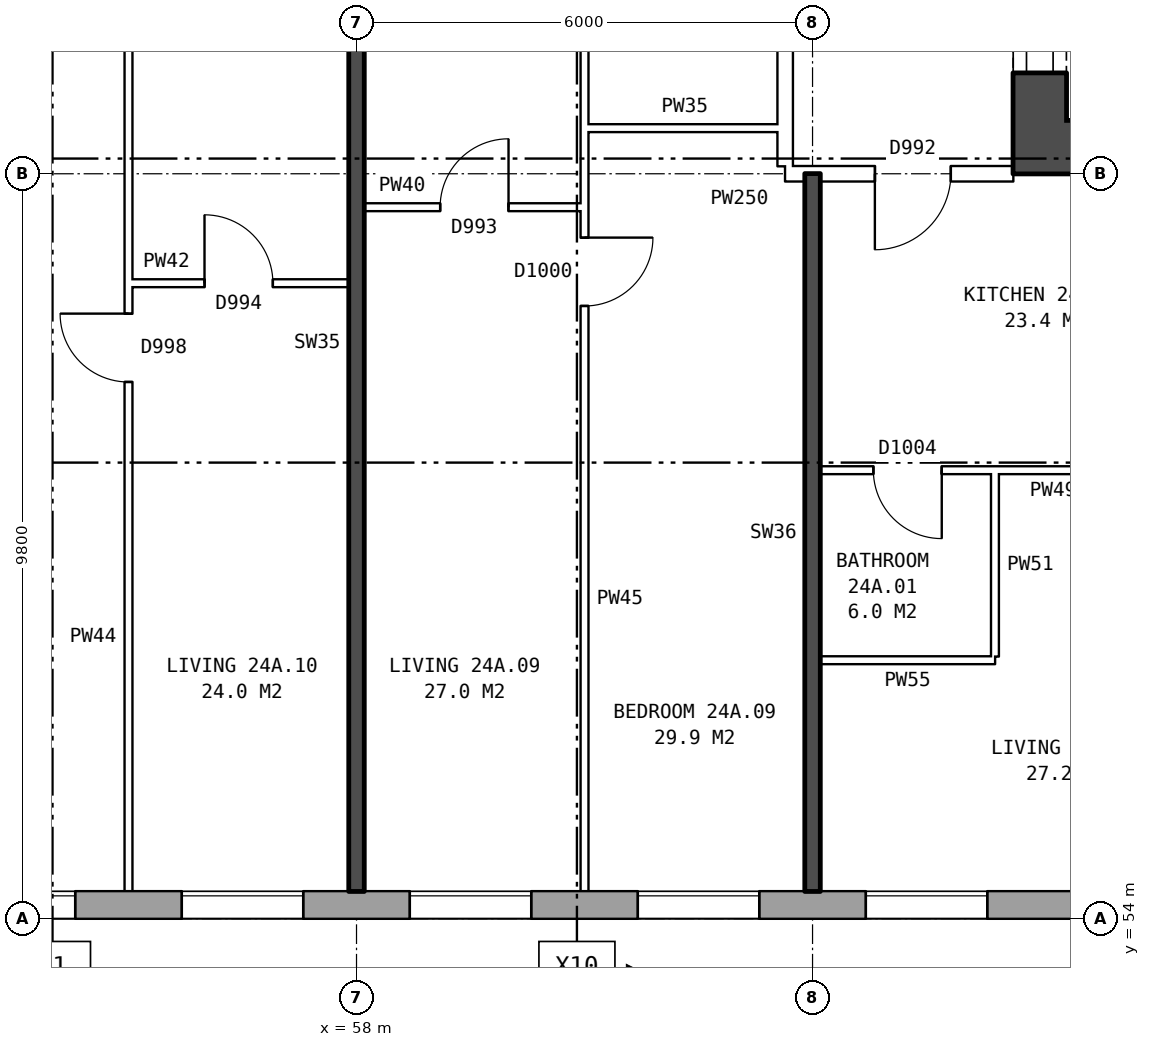
"""IFC4 building model, lengths in metres.
Left out: names, types, materials, properties, quantities, classifications, styles, units other than length and angle.
Written with IfcOpenShell. Run it as: python <this file> out.ifc"""

import sys

from ifc_helpers import new_model, si_unit, direction, frame, frame_2d, origin, place, context, subcontext, project, spatial, rectangle, extrude, element, fill, save


model = new_model("IFC4")
c1 = context("Model", 3, precision=1e-05, world=origin(), true_north=direction((0.0, 1.0)))
c2 = subcontext(c1, "Body", "Model", "MODEL_VIEW")
j1 = project(units=[si_unit("LENGTHUNIT", "METRE"), si_unit("PLANEANGLEUNIT", "RADIAN")], contexts=[c1])
p1 = place(None, origin())
s1 = spatial("IfcSite", under=j1, at=p1, CompositionType="ELEMENT")
p2 = place(p1, origin())
s2 = spatial("IfcBuilding", under=s1, at=p2, CompositionType="ELEMENT")
p3 = place(p2, frame((0.0, 0.0, 87.1)))
s3 = spatial("IfcBuildingStorey", under=s2, at=p3, CompositionType="ELEMENT", Elevation=87.1)
p4 = place(p3, frame((26.325, 54.18, 0.0), z_axis=(0.0, 0.0, 1.0), x_axis=(1.0, 0.0, 0.0)))
e1 = element("IfcWall", 1, at=p4, inside=s3, PredefinedType="STANDARD", context=c2, shape_type="SweptSolid", body=[
    extrude(rectangle(XDim=46.601, YDim=0.36, at=frame_2d((23.3, 0.0))), origin(), (0.0, 0.0, 1.0), 2.85),
])
p5 = place(p4, frame((2.375, 0.0, 0.8)))
e2 = element("IfcOpeningElement", 2, at=p5, cuts=e1, PredefinedType="OPENING", context=c2, shape_type="SweptSolid", body=[
    extrude(rectangle(XDim=1.6, YDim=1.8, at=frame_2d((0.8, 0.9))), frame((0.0, 0.19, 0.0), z_axis=(0.0, -1.0, 0.0), x_axis=(1.0, 0.0, 0.0)), (0.0, 0.0, 1.0), 0.38),
])
p6 = place(p4, frame((5.375, 0.0, 0.8)))
e3 = element("IfcOpeningElement", 3, at=p6, cuts=e1, PredefinedType="OPENING", context=c2, shape_type="SweptSolid", body=[
    extrude(rectangle(XDim=1.6, YDim=1.8, at=frame_2d((0.8, 0.9))), frame((0.0, 0.19, 0.0), z_axis=(0.0, -1.0, 0.0), x_axis=(1.0, 0.0, 0.0)), (0.0, 0.0, 1.0), 0.38),
])
p7 = place(p4, frame((8.375, 0.0, 0.8)))
e4 = element("IfcOpeningElement", 4, at=p7, cuts=e1, PredefinedType="OPENING", context=c2, shape_type="SweptSolid", body=[
    extrude(rectangle(XDim=1.6, YDim=1.8, at=frame_2d((0.8, 0.9))), frame((0.0, 0.19, 0.0), z_axis=(0.0, -1.0, 0.0), x_axis=(1.0, 0.0, 0.0)), (0.0, 0.0, 1.0), 0.38),
])
p8 = place(p4, frame((11.375, 0.0, 0.8)))
e5 = element("IfcOpeningElement", 5, at=p8, cuts=e1, PredefinedType="OPENING", context=c2, shape_type="SweptSolid", body=[
    extrude(rectangle(XDim=1.6, YDim=1.8, at=frame_2d((0.8, 0.9))), frame((0.0, 0.19, 0.0), z_axis=(0.0, -1.0, 0.0), x_axis=(1.0, 0.0, 0.0)), (0.0, 0.0, 1.0), 0.38),
])
p9 = place(p4, frame((14.375, 0.0, 0.8)))
e6 = element("IfcOpeningElement", 6, at=p9, cuts=e1, PredefinedType="OPENING", context=c2, shape_type="SweptSolid", body=[
    extrude(rectangle(XDim=1.6, YDim=1.8, at=frame_2d((0.8, 0.9))), frame((0.0, 0.19, 0.0), z_axis=(0.0, -1.0, 0.0), x_axis=(1.0, 0.0, 0.0)), (0.0, 0.0, 1.0), 0.38),
])
p10 = place(p4, frame((17.375, 0.0, 0.8)))
e7 = element("IfcOpeningElement", 7, at=p10, cuts=e1, PredefinedType="OPENING", context=c2, shape_type="SweptSolid", body=[
    extrude(rectangle(XDim=1.6, YDim=1.8, at=frame_2d((0.8, 0.9))), frame((0.0, 0.19, 0.0), z_axis=(0.0, -1.0, 0.0), x_axis=(1.0, 0.0, 0.0)), (0.0, 0.0, 1.0), 0.38),
])
p11 = place(p4, frame((19.875, 0.0, 1.4)))
e8 = element("IfcOpeningElement", 8, at=p11, cuts=e1, PredefinedType="OPENING", context=c2, shape_type="SweptSolid", body=[
    extrude(rectangle(XDim=1.2, YDim=1.2, at=frame_2d((0.6, 0.6))), frame((0.0, 0.19, 0.0), z_axis=(0.0, -1.0, 0.0), x_axis=(1.0, 0.0, 0.0)), (0.0, 0.0, 1.0), 0.38),
])
p12 = place(p4, frame((22.825, 0.0, 0.25)))
e9 = element("IfcOpeningElement", 9, at=p12, cuts=e1, PredefinedType="OPENING", context=c2, shape_type="SweptSolid", body=[
    extrude(rectangle(XDim=0.8, YDim=1.5, at=frame_2d((0.4, 0.75))), frame((0.0, 0.19, 0.0), z_axis=(0.0, -1.0, 0.0), x_axis=(1.0, 0.0, 0.0)), (0.0, 0.0, 1.0), 0.38),
])
p13 = place(p4, frame((26.375, 0.0, 0.8)))
e10 = element("IfcOpeningElement", 10, at=p13, cuts=e1, PredefinedType="OPENING", context=c2, shape_type="SweptSolid", body=[
    extrude(rectangle(XDim=1.6, YDim=1.8, at=frame_2d((0.8, 0.9))), frame((0.0, 0.19, 0.0), z_axis=(0.0, -1.0, 0.0), x_axis=(1.0, 0.0, 0.0)), (0.0, 0.0, 1.0), 0.38),
])
p14 = place(p4, frame((29.375, 0.0, 0.8)))
e11 = element("IfcOpeningElement", 11, at=p14, cuts=e1, PredefinedType="OPENING", context=c2, shape_type="SweptSolid", body=[
    extrude(rectangle(XDim=1.6, YDim=1.8, at=frame_2d((0.8, 0.9))), frame((0.0, 0.19, 0.0), z_axis=(0.0, -1.0, 0.0), x_axis=(1.0, 0.0, 0.0)), (0.0, 0.0, 1.0), 0.38),
])
p15 = place(p4, frame((32.375, 0.0, 0.8)))
e12 = element("IfcOpeningElement", 12, at=p15, cuts=e1, PredefinedType="OPENING", context=c2, shape_type="SweptSolid", body=[
    extrude(rectangle(XDim=1.6, YDim=1.8, at=frame_2d((0.8, 0.9))), frame((0.0, 0.19, 0.0), z_axis=(0.0, -1.0, 0.0), x_axis=(1.0, 0.0, 0.0)), (0.0, 0.0, 1.0), 0.38),
])
p16 = place(p4, frame((35.375, 0.0, 0.8)))
e13 = element("IfcOpeningElement", 13, at=p16, cuts=e1, PredefinedType="OPENING", context=c2, shape_type="SweptSolid", body=[
    extrude(rectangle(XDim=1.6, YDim=1.8, at=frame_2d((0.8, 0.9))), frame((0.0, 0.19, 0.0), z_axis=(0.0, -1.0, 0.0), x_axis=(1.0, 0.0, 0.0)), (0.0, 0.0, 1.0), 0.38),
])
p17 = place(p4, frame((38.375, 0.0, 0.8)))
e14 = element("IfcOpeningElement", 14, at=p17, cuts=e1, PredefinedType="OPENING", context=c2, shape_type="SweptSolid", body=[
    extrude(rectangle(XDim=1.6, YDim=1.8, at=frame_2d((0.8, 0.9))), frame((0.0, 0.19, 0.0), z_axis=(0.0, -1.0, 0.0), x_axis=(1.0, 0.0, 0.0)), (0.0, 0.0, 1.0), 0.38),
])
p18 = place(p4, frame((41.375, 0.0, 0.8)))
e15 = element("IfcOpeningElement", 15, at=p18, cuts=e1, PredefinedType="OPENING", context=c2, shape_type="SweptSolid", body=[
    extrude(rectangle(XDim=1.6, YDim=1.8, at=frame_2d((0.8, 0.9))), frame((0.0, 0.19, 0.0), z_axis=(0.0, -1.0, 0.0), x_axis=(1.0, 0.0, 0.0)), (0.0, 0.0, 1.0), 0.38),
])
p19 = place(p4, frame((44.375, 0.0, 0.8)))
e16 = element("IfcOpeningElement", 16, at=p19, cuts=e1, PredefinedType="OPENING", context=c2, shape_type="SweptSolid", body=[
    extrude(rectangle(XDim=1.6, YDim=1.8, at=frame_2d((0.8, 0.9))), frame((0.0, 0.19, 0.0), z_axis=(0.0, -1.0, 0.0), x_axis=(1.0, 0.0, 0.0)), (0.0, 0.0, 1.0), 0.38),
])
p20 = place(p4, frame((23.925, 0.0, 0.15)))
e17 = element("IfcOpeningElement", 17, at=p20, cuts=e1, PredefinedType="OPENING", context=c2, shape_type="SweptSolid", body=[
    extrude(rectangle(XDim=0.6, YDim=0.9, at=frame_2d((0.3, 0.45))), frame((0.0, 0.19, 0.0), z_axis=(0.0, -1.0, 0.0), x_axis=(1.0, 0.0, 0.0)), (0.0, 0.0, 1.0), 0.38),
])
p21 = place(p3, frame((66.99, 64.5, 0.0), z_axis=(0.0, 0.0, 1.0), x_axis=(0.0, 1.0, 0.0)))
e18 = element("IfcWall", 18, at=p21, inside=s3, PredefinedType="SHEAR", context=c2, shape_type="SweptSolid", body=[
    extrude(rectangle(XDim=11.0, YDim=0.7, at=frame_2d((5.5, 0.0))), origin(), (0.0, 0.0, 1.0), 2.85),
])
p22 = place(p21, frame((0.625, 0.0, 0.0)))
e19 = element("IfcOpeningElement", 19, at=p22, cuts=e18, PredefinedType="OPENING", context=c2, shape_type="SweptSolid", body=[
    extrude(rectangle(XDim=1.1, YDim=2.1, at=frame_2d((0.55, 1.05))), frame((0.0, 0.36, 0.0), z_axis=(0.0, -1.0, 0.0), x_axis=(1.0, 0.0, 0.0)), (0.0, 0.0, 1.0), 0.72),
])
p23 = place(p21, frame((9.2, 0.0, 0.0)))
e20 = element("IfcOpeningElement", 20, at=p23, cuts=e18, PredefinedType="OPENING", context=c2, shape_type="SweptSolid", body=[
    extrude(rectangle(XDim=1.1, YDim=2.1, at=frame_2d((0.55, 1.05))), frame((0.0, 0.36, 0.0), z_axis=(0.0, -1.0, 0.0), x_axis=(1.0, 0.0, 0.0)), (0.0, 0.0, 1.0), 0.72),
])
p24 = place(p3, frame((66.64, 64.15, 0.0), z_axis=(0.0, 0.0, 1.0), x_axis=(1.0, 0.0, 0.0)))
e21 = element("IfcWall", 21, at=p24, inside=s3, PredefinedType="SHEAR", context=c2, shape_type="SweptSolid", body=[
    extrude(rectangle(XDim=9.0, YDim=0.7, at=frame_2d((4.5, 0.0))), origin(), (0.0, 0.0, 1.0), 2.85),
])
p25 = place(p3, frame((63.64, 63.9, 0.0), z_axis=(0.0, 0.0, 1.0), x_axis=(0.0, 1.0, 0.0)))
e22 = element("IfcWall", 22, at=p25, inside=s3, PredefinedType="PARTITIONING", context=c2, shape_type="SweptSolid", body=[
    extrude(rectangle(XDim=12.2, YDim=0.2, at=frame_2d((6.1, 0.0))), origin(), (0.0, 0.0, 1.0), 2.85),
])
p26 = place(p25, frame((5.1, 0.0, 0.0)))
e23 = element("IfcOpeningElement", 23, at=p26, cuts=e22, PredefinedType="OPENING", context=c2, shape_type="SweptSolid", body=[
    extrude(rectangle(XDim=2.0, YDim=2.1, at=frame_2d((1.0, 1.05))), frame((0.0, 0.11, 0.0), z_axis=(0.0, -1.0, 0.0), x_axis=(1.0, 0.0, 0.0)), (0.0, 0.0, 1.0), 0.22),
])
p27 = place(p3, frame((64.1, 57.4, 0.0), z_axis=(0.0, 0.0, 1.0), x_axis=(1.0, 0.0, 0.0)))
e24 = element("IfcWall", 24, at=p27, inside=s3, PredefinedType="PARTITIONING", context=c2, shape_type="SweptSolid", body=[
    extrude(rectangle(XDim=2.3, YDim=0.1, at=frame_2d((1.15, 0.0))), origin(), (0.0, 0.0, 1.0), 2.85),
])
p28 = place(p3, frame((64.1, 59.9, 0.0), z_axis=(0.0, 0.0, 1.0), x_axis=(1.0, 0.0, 0.0)))
e25 = element("IfcWall", 25, at=p28, inside=s3, PredefinedType="PARTITIONING", context=c2, shape_type="SweptSolid", body=[
    extrude(rectangle(XDim=5.8, YDim=0.1, at=frame_2d((2.9, 0.0))), origin(), (0.0, 0.0, 1.0), 2.85),
])
p29 = place(p28, frame((3.6, 0.0, 0.0)))
e26 = element("IfcOpeningElement", 26, at=p29, cuts=e25, PredefinedType="OPENING", context=c2, shape_type="SweptSolid", body=[
    extrude(rectangle(XDim=0.9, YDim=2.1, at=frame_2d((0.45, 1.05))), frame((0.0, 0.06, 0.0), z_axis=(0.0, -1.0, 0.0), x_axis=(1.0, 0.0, 0.0)), (0.0, 0.0, 1.0), 0.12),
])
p30 = place(p28, frame((0.7, 0.0, 0.0)))
e27 = element("IfcOpeningElement", 27, at=p30, cuts=e25, PredefinedType="OPENING", context=c2, shape_type="SweptSolid", body=[
    extrude(rectangle(XDim=0.9, YDim=2.1, at=frame_2d((0.45, 1.05))), frame((0.0, 0.06, 0.0), z_axis=(0.0, -1.0, 0.0), x_axis=(1.0, 0.0, 0.0)), (0.0, 0.0, 1.0), 0.12),
])
p31 = place(p3, frame((55.0, 62.36, 0.0), z_axis=(0.0, 0.0, 1.0), x_axis=(1.0, 0.0, 0.0)))
e28 = element("IfcWall", 28, at=p31, inside=s3, PredefinedType="PARTITIONING", context=c2, shape_type="SweptSolid", body=[
    extrude(rectangle(XDim=2.9, YDim=0.1, at=frame_2d((1.45, 0.0))), origin(), (0.0, 0.0, 1.0), 2.85),
])
p32 = place(p31, frame((1.0, 0.0, 0.0)))
e29 = element("IfcOpeningElement", 29, at=p32, cuts=e28, PredefinedType="OPENING", context=c2, shape_type="SweptSolid", body=[
    extrude(rectangle(XDim=0.9, YDim=2.1, at=frame_2d((0.45, 1.05))), frame((0.0, 0.06, 0.0), z_axis=(0.0, -1.0, 0.0), x_axis=(1.0, 0.0, 0.0)), (0.0, 0.0, 1.0), 0.12),
])
p33 = place(p3, frame((58.1, 63.36, 0.0), z_axis=(0.0, 0.0, 1.0), x_axis=(1.0, 0.0, 0.0)))
e30 = element("IfcWall", 30, at=p33, inside=s3, PredefinedType="PARTITIONING", context=c2, shape_type="SweptSolid", body=[
    extrude(rectangle(XDim=2.9, YDim=0.1, at=frame_2d((1.45, 0.0))), origin(), (0.0, 0.0, 1.0), 2.85),
])
p34 = place(p33, frame((1.0, 0.0, 0.0)))
e31 = element("IfcOpeningElement", 31, at=p34, cuts=e30, PredefinedType="OPENING", context=c2, shape_type="SweptSolid", body=[
    extrude(rectangle(XDim=0.9, YDim=2.1, at=frame_2d((0.45, 1.05))), frame((0.0, 0.06, 0.0), z_axis=(0.0, -1.0, 0.0), x_axis=(1.0, 0.0, 0.0)), (0.0, 0.0, 1.0), 0.12),
])
p35 = place(p3, frame((63.64, 63.8, 0.0), z_axis=(0.0, 0.0, 1.0), x_axis=(1.0, 0.0, 0.0)))
e32 = element("IfcWall", 32, at=p35, inside=s3, PredefinedType="PARTITIONING", context=c2, shape_type="SweptSolid", body=[
    extrude(rectangle(XDim=3.0, YDim=0.2, at=frame_2d((1.5, 0.0))), origin(), (0.0, 0.0, 1.0), 2.85),
])
p36 = place(p35, frame((1.18, 0.0, 0.0)))
e33 = element("IfcOpeningElement", 33, at=p36, cuts=e32, PredefinedType="OPENING", context=c2, shape_type="SweptSolid", body=[
    extrude(rectangle(XDim=1.0, YDim=2.1, at=frame_2d((0.5, 1.05))), frame((0.0, 0.11, 0.0), z_axis=(0.0, -1.0, 0.0), x_axis=(1.0, 0.0, 0.0)), (0.0, 0.0, 1.0), 0.22),
])
p37 = place(p3, frame((61.0, 64.4, 0.0), z_axis=(0.0, 0.0, 1.0), x_axis=(1.0, 0.0, 0.0)))
e34 = element("IfcWall", 34, at=p37, inside=s3, PredefinedType="PARTITIONING", context=c2, shape_type="SweptSolid", body=[
    extrude(rectangle(XDim=2.64, YDim=0.1, at=frame_2d((1.32, 0.0))), origin(), (0.0, 0.0, 1.0), 2.85),
])
p38 = place(p3, frame((55.0, 54.36, 0.0), z_axis=(0.0, 0.0, 1.0), x_axis=(0.0, 1.0, 0.0)))
e35 = element("IfcWall", 35, at=p38, inside=s3, PredefinedType="PARTITIONING", context=c2, shape_type="SweptSolid", body=[
    extrude(rectangle(XDim=14.34, YDim=0.1, at=frame_2d((7.17, 0.0))), origin(), (0.0, 0.0, 1.0), 2.85),
])
p39 = place(p38, frame((6.7, 0.0, 0.0)))
e36 = element("IfcOpeningElement", 36, at=p39, cuts=e35, PredefinedType="OPENING", context=c2, shape_type="SweptSolid", body=[
    extrude(rectangle(XDim=0.9, YDim=2.1, at=frame_2d((0.45, 1.05))), frame((0.0, 0.06, 0.0), z_axis=(0.0, -1.0, 0.0), x_axis=(1.0, 0.0, 0.0)), (0.0, 0.0, 1.0), 0.12),
])
p40 = place(p38, frame((13.04, 0.0, 0.0)))
e37 = element("IfcOpeningElement", 37, at=p40, cuts=e35, PredefinedType="OPENING", context=c2, shape_type="SweptSolid", body=[
    extrude(rectangle(XDim=0.9, YDim=2.1, at=frame_2d((0.45, 1.05))), frame((0.0, 0.06, 0.0), z_axis=(0.0, -1.0, 0.0), x_axis=(1.0, 0.0, 0.0)), (0.0, 0.0, 1.0), 0.12),
])
p41 = place(p3, frame((58.0, 54.36, 0.0), z_axis=(0.0, 0.0, 1.0), x_axis=(0.0, 1.0, 0.0)))
e38 = element("IfcWall", 38, at=p41, inside=s3, PredefinedType="SOLIDWALL", context=c2, shape_type="SweptSolid", body=[
    extrude(rectangle(XDim=14.44, YDim=0.2, at=frame_2d((7.22, 0.0))), origin(), (0.0, 0.0, 1.0), 2.85),
])
p42 = place(p3, frame((61.0, 54.36, 0.0), z_axis=(0.0, 0.0, 1.0), x_axis=(0.0, 1.0, 0.0)))
e39 = element("IfcWall", 39, at=p42, inside=s3, PredefinedType="PARTITIONING", context=c2, shape_type="SweptSolid", body=[
    extrude(rectangle(XDim=14.34, YDim=0.1, at=frame_2d((7.17, 0.0))), origin(), (0.0, 0.0, 1.0), 2.85),
])
p43 = place(p42, frame((7.7, 0.0, 0.0)))
e40 = element("IfcOpeningElement", 40, at=p43, cuts=e39, PredefinedType="OPENING", context=c2, shape_type="SweptSolid", body=[
    extrude(rectangle(XDim=0.9, YDim=2.1, at=frame_2d((0.45, 1.05))), frame((0.0, 0.06, 0.0), z_axis=(0.0, -1.0, 0.0), x_axis=(1.0, 0.0, 0.0)), (0.0, 0.0, 1.0), 0.12),
])
p44 = place(p42, frame((13.04, 0.0, 0.0)))
e41 = element("IfcOpeningElement", 41, at=p44, cuts=e39, PredefinedType="OPENING", context=c2, shape_type="SweptSolid", body=[
    extrude(rectangle(XDim=0.9, YDim=2.1, at=frame_2d((0.45, 1.05))), frame((0.0, 0.06, 0.0), z_axis=(0.0, -1.0, 0.0), x_axis=(1.0, 0.0, 0.0)), (0.0, 0.0, 1.0), 0.12),
])
p45 = place(p3, frame((64.0, 54.36, 0.0), z_axis=(0.0, 0.0, 1.0), x_axis=(0.0, 1.0, 0.0)))
e42 = element("IfcWall", 42, at=p45, inside=s3, PredefinedType="SOLIDWALL", context=c2, shape_type="SweptSolid", body=[
    extrude(rectangle(XDim=9.44, YDim=0.2, at=frame_2d((4.72, 0.0))), origin(), (0.0, 0.0, 1.0), 2.85),
])
p46 = place(p3, frame((66.4, 57.45, 0.0), z_axis=(0.0, 0.0, 1.0), x_axis=(0.0, 1.0, 0.0)))
e43 = element("IfcWall", 43, at=p46, inside=s3, PredefinedType="PARTITIONING", context=c2, shape_type="SweptSolid", body=[
    extrude(rectangle(XDim=2.4, YDim=0.1, at=frame_2d((1.2, 0.0))), origin(), (0.0, 0.0, 1.0), 2.85),
])
p47 = place(p13, origin())
e44 = element("IfcWindow", 44, at=p47, inside=s3, PartitioningType="SINGLE_PANEL", PredefinedType="WINDOW", context=c2, shape_type="SweptSolid", body=[
    extrude(rectangle(XDim=1.6, YDim=1.8, at=frame_2d((0.8, 0.9))), frame((0.0, 0.15, 0.0), z_axis=(0.0, -1.0, 0.0), x_axis=(1.0, 0.0, 0.0)), (0.0, 0.0, 1.0), 0.06),
])
fill(e10, e44)
p48 = place(p14, origin())
e45 = element("IfcWindow", 45, at=p48, inside=s3, PartitioningType="SINGLE_PANEL", PredefinedType="WINDOW", context=c2, shape_type="SweptSolid", body=[
    extrude(rectangle(XDim=1.6, YDim=1.8, at=frame_2d((0.8, 0.9))), frame((0.0, 0.15, 0.0), z_axis=(0.0, -1.0, 0.0), x_axis=(1.0, 0.0, 0.0)), (0.0, 0.0, 1.0), 0.06),
])
fill(e11, e45)
p49 = place(p15, origin())
e46 = element("IfcWindow", 46, at=p49, inside=s3, PartitioningType="SINGLE_PANEL", PredefinedType="WINDOW", context=c2, shape_type="SweptSolid", body=[
    extrude(rectangle(XDim=1.6, YDim=1.8, at=frame_2d((0.8, 0.9))), frame((0.0, 0.15, 0.0), z_axis=(0.0, -1.0, 0.0), x_axis=(1.0, 0.0, 0.0)), (0.0, 0.0, 1.0), 0.06),
])
fill(e12, e46)
p50 = place(p16, origin())
e47 = element("IfcWindow", 47, at=p50, inside=s3, PartitioningType="SINGLE_PANEL", PredefinedType="WINDOW", context=c2, shape_type="SweptSolid", body=[
    extrude(rectangle(XDim=1.6, YDim=1.8, at=frame_2d((0.8, 0.9))), frame((0.0, 0.15, 0.0), z_axis=(0.0, -1.0, 0.0), x_axis=(1.0, 0.0, 0.0)), (0.0, 0.0, 1.0), 0.06),
])
fill(e13, e47)
p51 = place(p17, origin())
e48 = element("IfcWindow", 48, at=p51, inside=s3, PartitioningType="SINGLE_PANEL", PredefinedType="WINDOW", context=c2, shape_type="SweptSolid", body=[
    extrude(rectangle(XDim=1.6, YDim=1.8, at=frame_2d((0.8, 0.9))), frame((0.0, 0.15, 0.0), z_axis=(0.0, -1.0, 0.0), x_axis=(1.0, 0.0, 0.0)), (0.0, 0.0, 1.0), 0.06),
])
fill(e14, e48)
p52 = place(p22, origin())
e49 = element("IfcDoor", 49, at=p52, inside=s3, OperationType="DOUBLE_DOOR_SLIDING", PredefinedType="DOOR", context=c2, shape_type="SweptSolid", body=[
    extrude(rectangle(XDim=1.1, YDim=2.1, at=frame_2d((0.55, 1.05))), frame((0.0, -0.285, 0.0), z_axis=(0.0, -1.0, 0.0), x_axis=(1.0, 0.0, 0.0)), (0.0, 0.0, 1.0), 0.05),
])
fill(e19, e49)
p53 = place(p36, frame((1.0, 0.0, 0.0), z_axis=(0.0, 0.0, 1.0), x_axis=(-1.0, 0.0, 0.0)))
e50 = element("IfcDoor", 50, at=p53, inside=s3, OperationType="SINGLE_SWING_RIGHT", PredefinedType="DOOR", context=c2, shape_type="SweptSolid", body=[
    extrude(rectangle(XDim=1.0, YDim=2.1, at=frame_2d((0.5, 1.05))), frame((0.0, 0.025, 0.0), z_axis=(0.0, -1.0, 0.0), x_axis=(1.0, 0.0, 0.0)), (0.0, 0.0, 1.0), 0.05),
])
fill(e33, e50)
p54 = place(p30, frame((0.9, 0.0, 0.0), z_axis=(0.0, 0.0, 1.0), x_axis=(-1.0, 0.0, 0.0)))
e51 = element("IfcDoor", 51, at=p54, inside=s3, OperationType="SINGLE_SWING_LEFT", PredefinedType="DOOR", context=c2, shape_type="SweptSolid", body=[
    extrude(rectangle(XDim=0.9, YDim=2.1, at=frame_2d((0.45, 1.05))), frame((0.0, 0.025, 0.0), z_axis=(0.0, -1.0, 0.0), x_axis=(1.0, 0.0, 0.0)), (0.0, 0.0, 1.0), 0.05),
])
fill(e27, e51)
p55 = place(p43, frame((0.9, 0.0, 0.0), z_axis=(0.0, 0.0, 1.0), x_axis=(-1.0, 0.0, 0.0)))
e52 = element("IfcDoor", 52, at=p55, inside=s3, OperationType="SINGLE_SWING_LEFT", PredefinedType="DOOR", context=c2, shape_type="SweptSolid", body=[
    extrude(rectangle(XDim=0.9, YDim=2.1, at=frame_2d((0.45, 1.05))), frame((0.0, 0.025, 0.0), z_axis=(0.0, -1.0, 0.0), x_axis=(1.0, 0.0, 0.0)), (0.0, 0.0, 1.0), 0.05),
])
fill(e40, e52)
p56 = place(p34, origin())
e53 = element("IfcDoor", 53, at=p56, inside=s3, OperationType="SINGLE_SWING_RIGHT", PredefinedType="DOOR", context=c2, shape_type="SweptSolid", body=[
    extrude(rectangle(XDim=0.9, YDim=2.1, at=frame_2d((0.45, 1.05))), frame((0.0, 0.025, 0.0), z_axis=(0.0, -1.0, 0.0), x_axis=(1.0, 0.0, 0.0)), (0.0, 0.0, 1.0), 0.05),
])
fill(e31, e53)
p57 = place(p39, origin())
e54 = element("IfcDoor", 54, at=p57, inside=s3, OperationType="SINGLE_SWING_RIGHT", PredefinedType="DOOR", context=c2, shape_type="SweptSolid", body=[
    extrude(rectangle(XDim=0.9, YDim=2.1, at=frame_2d((0.45, 1.05))), frame((0.0, 0.025, 0.0), z_axis=(0.0, -1.0, 0.0), x_axis=(1.0, 0.0, 0.0)), (0.0, 0.0, 1.0), 0.05),
])
fill(e36, e54)
p58 = place(p32, origin())
e55 = element("IfcDoor", 55, at=p58, inside=s3, OperationType="SINGLE_SWING_LEFT", PredefinedType="DOOR", context=c2, shape_type="SweptSolid", body=[
    extrude(rectangle(XDim=0.9, YDim=2.1, at=frame_2d((0.45, 1.05))), frame((0.0, 0.025, 0.0), z_axis=(0.0, -1.0, 0.0), x_axis=(1.0, 0.0, 0.0)), (0.0, 0.0, 1.0), 0.05),
])
fill(e29, e55)
save(model, sys.argv[1])
